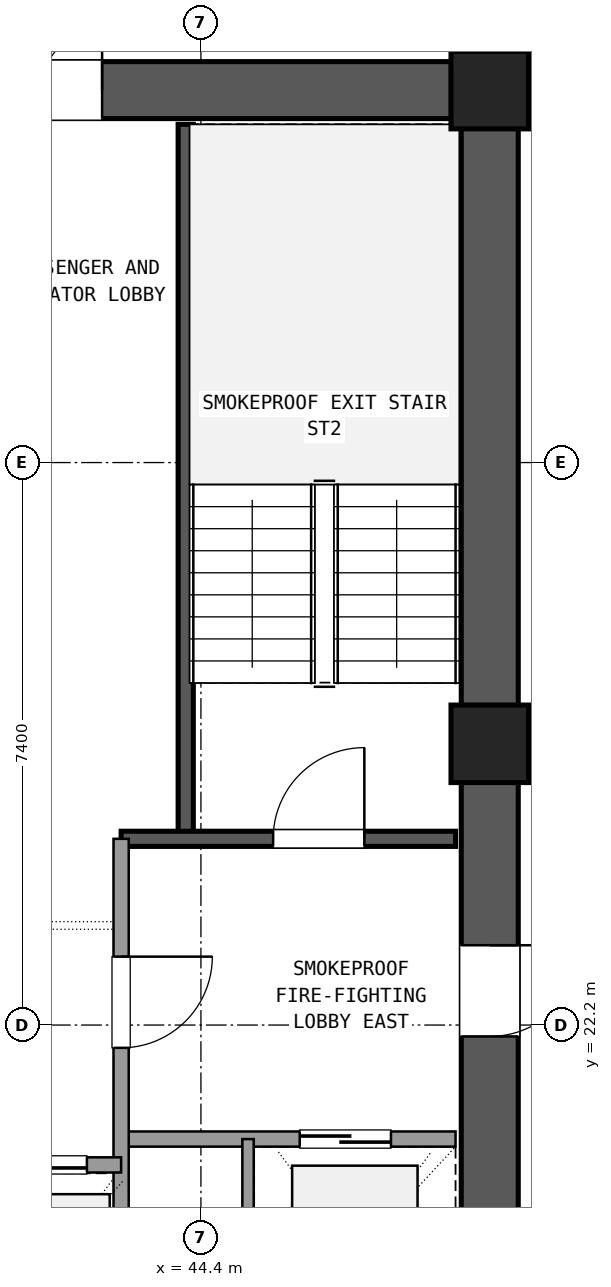
"""IFC4 building model, lengths in metres.
Left out: names, types, materials, properties, quantities, classifications, styles, units other than length and angle.
Written with IfcOpenShell. Run it as: python <this file> out.ifc"""

import sys

from ifc_helpers import new_model, si_unit, direction, frame, frame_2d, origin, origin_2d, place, context, subcontext, project, spatial, rectangle, extrude, element, fill, save


model = new_model("IFC4")
c1 = context("Model", 3, precision=1e-05, world=origin(), true_north=direction((0.0, 1.0)))
c2 = subcontext(c1, "Body", "Model", "MODEL_VIEW")
j1 = project(units=[si_unit("LENGTHUNIT", "METRE"), si_unit("PLANEANGLEUNIT", "RADIAN")], contexts=[c1])
p1 = place(None, origin())
s1 = spatial("IfcSite", under=j1, at=p1, CompositionType="ELEMENT")
p2 = place(p1, origin())
s2 = spatial("IfcBuilding", under=s1, at=p2, CompositionType="ELEMENT")
p3 = place(p2, frame((0.0, 0.0, 102.78)))
s3 = spatial("IfcBuildingStorey", under=s2, at=p3, CompositionType="ELEMENT", Elevation=102.78)
for number, where, z_axis, x_axis in (
    (1, (48.2, 25.9, 0.0), (0.0, 0.0, 1.0), (1.0, 0.0, 0.0)),
    (2, (48.2, 34.5, 0.0), (0.0, 0.0, 1.0), (1.0, 0.0, 0.0)),
):
    element("IfcColumn", number, at=place(p3, frame(where, z_axis=z_axis, x_axis=x_axis)), inside=s3, PredefinedType="COLUMN", context=c2, shape_type="SweptSolid", body=[
        extrude(rectangle(XDim=1.02, YDim=1.02, at=origin_2d()), origin(), (0.0, 0.0, 1.0), 3.6),
    ])
p4 = place(p3, frame((48.2, 17.805, 0.0), z_axis=(0.0, 0.0, 1.0), x_axis=(0.0, 1.0, 0.0)))
e3 = element("IfcWall", 3, at=p4, inside=s3, PredefinedType="SHEAR", context=c2, shape_type="SweptSolid", body=[
    extrude(rectangle(XDim=7.59, YDim=0.75, at=frame_2d((3.795, 0.0))), origin(), (0.0, 0.0, 1.0), 3.32),
])
p5 = place(p4, frame((4.245, 0.0, 0.0)))
e4 = element("IfcOpeningElement", 4, at=p5, cuts=e3, PredefinedType="OPENING", context=c2, shape_type="SweptSolid", body=[
    extrude(rectangle(XDim=1.2, YDim=2.15, at=frame_2d((0.6, 1.075))), frame((0.0, 0.385, 0.0), z_axis=(0.0, -1.0, 0.0), x_axis=(1.0, 0.0, 0.0)), (0.0, 0.0, 1.0), 0.77),
])
p6 = place(p3, frame((48.2, 26.405, 0.0), z_axis=(0.0, 0.0, 1.0), x_axis=(0.0, 1.0, 0.0)))
e5 = element("IfcWall", 5, at=p6, inside=s3, PredefinedType="SHEAR", context=c2, shape_type="SweptSolid", body=[
    extrude(rectangle(XDim=7.59, YDim=0.75, at=frame_2d((3.795, 0.0))), origin(), (0.0, 0.0, 1.0), 3.32),
])
p7 = place(p3, frame((47.695, 34.5, 0.0), z_axis=(0.0, 0.0, 1.0), x_axis=(-1.0, 0.0, 0.0)))
e6 = element("IfcWall", 6, at=p7, inside=s3, PredefinedType="SHEAR", context=c2, shape_type="SweptSolid", body=[
    extrude(rectangle(XDim=10.19, YDim=0.75, at=frame_2d((5.095, 0.0))), origin(), (0.0, 0.0, 1.0), 3.32),
])
p8 = place(p7, frame((4.595, 0.0, 0.0)))
e7 = element("IfcOpeningElement", 7, at=p8, cuts=e6, PredefinedType="OPENING", context=c2, shape_type="SweptSolid", body=[
    extrude(rectangle(XDim=1.6, YDim=2.2, at=frame_2d((0.8, 1.1))), frame((0.0, 0.385, 0.0), z_axis=(0.0, -1.0, 0.0), x_axis=(1.0, 0.0, 0.0)), (0.0, 0.0, 1.0), 0.77),
])
p9 = place(p3, frame((44.2, 24.65, 0.0), z_axis=(0.0, 0.0, 1.0), x_axis=(0.0, 1.0, 0.0)))
e8 = element("IfcWall", 8, at=p9, inside=s3, PredefinedType="SHEAR", context=c2, shape_type="SweptSolid", body=[
    extrude(rectangle(XDim=9.4, YDim=0.2, at=frame_2d((4.7, 0.0))), origin(), (0.0, 0.0, 1.0), 3.32),
])
p10 = place(p3, frame((43.35, 24.65, 0.0), z_axis=(0.0, 0.0, 1.0), x_axis=(1.0, 0.0, 0.0)))
e9 = element("IfcWall", 9, at=p10, inside=s3, PredefinedType="SHEAR", context=c2, shape_type="SweptSolid", body=[
    extrude(rectangle(XDim=4.4, YDim=0.2, at=frame_2d((2.2, 0.0))), origin(), (0.0, 0.0, 1.0), 3.32),
])
p11 = place(p10, frame((2.0, 0.0, 0.0)))
e10 = element("IfcOpeningElement", 10, at=p11, cuts=e9, PredefinedType="OPENING", context=c2, shape_type="SweptSolid", body=[
    extrude(rectangle(XDim=1.2, YDim=2.15, at=frame_2d((0.6, 1.075))), frame((0.0, 0.11, 0.0), z_axis=(0.0, -1.0, 0.0), x_axis=(1.0, 0.0, 0.0)), (0.0, 0.0, 1.0), 0.22),
])
p12 = place(p3, frame((43.35, 20.7, 0.0), z_axis=(0.0, 0.0, 1.0), x_axis=(1.0, 0.0, 0.0)))
e11 = element("IfcWall", 11, at=p12, inside=s3, PredefinedType="SOLIDWALL", context=c2, shape_type="SweptSolid", body=[
    extrude(rectangle(XDim=4.4, YDim=0.2, at=frame_2d((2.2, 0.0))), origin(), (0.0, 0.0, 1.0), 2.61),
])
p13 = place(p12, frame((2.35, 0.0, 0.0)))
e12 = element("IfcOpeningElement", 12, at=p13, cuts=e11, PredefinedType="OPENING", context=c2, shape_type="SweptSolid", body=[
    extrude(rectangle(XDim=1.2, YDim=2.15, at=frame_2d((0.6, 1.075))), frame((0.0, 0.11, 0.0), z_axis=(0.0, -1.0, 0.0), x_axis=(1.0, 0.0, 0.0)), (0.0, 0.0, 1.0), 0.22),
])
p14 = place(p3, frame((43.35, 17.75, 0.0), z_axis=(0.0, 0.0, 1.0), x_axis=(0.0, 1.0, 0.0)))
e13 = element("IfcWall", 13, at=p14, inside=s3, PredefinedType="SOLIDWALL", context=c2, shape_type="SweptSolid", body=[
    extrude(rectangle(XDim=6.9, YDim=0.2, at=frame_2d((3.45, 0.0))), origin(), (0.0, 0.0, 1.0), 2.61),
])
p15 = place(p14, frame((4.15, 0.0, 0.0)))
e14 = element("IfcOpeningElement", 14, at=p15, cuts=e13, PredefinedType="OPENING", context=c2, shape_type="SweptSolid", body=[
    extrude(rectangle(XDim=1.2, YDim=2.15, at=frame_2d((0.6, 1.075))), frame((0.0, 0.11, 0.0), z_axis=(0.0, -1.0, 0.0), x_axis=(1.0, 0.0, 0.0)), (0.0, 0.0, 1.0), 0.22),
])
p16 = place(p3, frame((45.02, 17.75, 0.0), z_axis=(0.0, 0.0, 1.0), x_axis=(0.0, 1.0, 0.0)))
e15 = element("IfcWall", 15, at=p16, inside=s3, PredefinedType="PARTITIONING", context=c2, shape_type="SweptSolid", body=[
    extrude(rectangle(XDim=2.95, YDim=0.15, at=frame_2d((1.475, 0.0))), origin(), (0.0, 0.0, 1.0), 2.61),
])
p17 = place(p3, frame((37.25, 20.36, 0.0), z_axis=(0.0, 0.0, 1.0), x_axis=(1.0, 0.0, 0.0)))
e16 = element("IfcWall", 16, at=p17, inside=s3, PredefinedType="SOLIDWALL", context=c2, shape_type="SweptSolid", body=[
    extrude(rectangle(XDim=6.1, YDim=0.2, at=frame_2d((3.05, 0.0))), origin(), (0.0, 0.0, 1.0), 2.61),
])
p18 = place(p17, frame((0.45, 0.0, 0.0)))
e17 = element("IfcOpeningElement", 17, at=p18, cuts=e16, PredefinedType="OPENING", context=c2, shape_type="SweptSolid", body=[
    extrude(rectangle(XDim=1.1, YDim=2.15, at=frame_2d((0.55, 1.075))), frame((0.0, 0.11, 0.0), z_axis=(0.0, -1.0, 0.0), x_axis=(1.0, 0.0, 0.0)), (0.0, 0.0, 1.0), 0.22),
])
p19 = place(p17, frame((2.5, 0.0, 0.0)))
e18 = element("IfcOpeningElement", 18, at=p19, cuts=e16, PredefinedType="OPENING", context=c2, shape_type="SweptSolid", body=[
    extrude(rectangle(XDim=1.1, YDim=2.15, at=frame_2d((0.55, 1.075))), frame((0.0, 0.11, 0.0), z_axis=(0.0, -1.0, 0.0), x_axis=(1.0, 0.0, 0.0)), (0.0, 0.0, 1.0), 0.22),
])
p20 = place(p17, frame((4.55, 0.0, 0.0)))
e19 = element("IfcOpeningElement", 19, at=p20, cuts=e16, PredefinedType="OPENING", context=c2, shape_type="SweptSolid", body=[
    extrude(rectangle(XDim=1.1, YDim=2.15, at=frame_2d((0.55, 1.075))), frame((0.0, 0.11, 0.0), z_axis=(0.0, -1.0, 0.0), x_axis=(1.0, 0.0, 0.0)), (0.0, 0.0, 1.0), 0.22),
])
p21 = place(p11, origin())
e20 = element("IfcDoor", 20, at=p21, inside=s3, OperationType="SINGLE_SWING_RIGHT", PredefinedType="DOOR", context=c2, shape_type="SweptSolid", body=[
    extrude(rectangle(XDim=1.2, YDim=2.15, at=frame_2d((0.6, 1.075))), frame((0.0, 0.025, 0.0), z_axis=(0.0, -1.0, 0.0), x_axis=(1.0, 0.0, 0.0)), (0.0, 0.0, 1.0), 0.05),
])
fill(e10, e20)
p22 = place(p13, origin())
e21 = element("IfcDoor", 21, at=p22, inside=s3, OperationType="SLIDING_TO_RIGHT", PredefinedType="DOOR", context=c2, shape_type="SweptSolid", body=[
    extrude(rectangle(XDim=1.2, YDim=2.15, at=frame_2d((0.6, 1.075))), frame((0.0, 0.025, 0.0), z_axis=(0.0, -1.0, 0.0), x_axis=(1.0, 0.0, 0.0)), (0.0, 0.0, 1.0), 0.05),
])
fill(e12, e21)
p23 = place(p15, frame((1.2, 0.0, 0.0), z_axis=(0.0, 0.0, 1.0), x_axis=(-1.0, 0.0, 0.0)))
e22 = element("IfcDoor", 22, at=p23, inside=s3, OperationType="SINGLE_SWING_RIGHT", PredefinedType="DOOR", context=c2, shape_type="SweptSolid", body=[
    extrude(rectangle(XDim=1.2, YDim=2.15, at=frame_2d((0.6, 1.075))), frame((0.0, 0.025, 0.0), z_axis=(0.0, -1.0, 0.0), x_axis=(1.0, 0.0, 0.0)), (0.0, 0.0, 1.0), 0.05),
])
fill(e14, e22)
p24 = place(p5, frame((1.2, 0.0, 0.0), z_axis=(0.0, 0.0, 1.0), x_axis=(-1.0, 0.0, 0.0)))
e23 = element("IfcDoor", 23, at=p24, inside=s3, OperationType="SINGLE_SWING_RIGHT", PredefinedType="DOOR", context=c2, shape_type="SweptSolid", body=[
    extrude(rectangle(XDim=1.2, YDim=2.15, at=frame_2d((0.6, 1.075))), frame((0.0, 0.025, 0.0), z_axis=(0.0, -1.0, 0.0), x_axis=(1.0, 0.0, 0.0)), (0.0, 0.0, 1.0), 0.05),
])
fill(e4, e23)
p25 = place(p8, frame((1.6, 0.0, 0.0), z_axis=(0.0, 0.0, 1.0), x_axis=(-1.0, 0.0, 0.0)))
e24 = element("IfcDoor", 24, at=p25, inside=s3, OperationType="DOUBLE_DOOR_SINGLE_SWING", PredefinedType="DOOR", context=c2, shape_type="SweptSolid", body=[
    extrude(rectangle(XDim=1.6, YDim=2.2, at=frame_2d((0.8, 1.1))), frame((0.0, 0.025, 0.0), z_axis=(0.0, -1.0, 0.0), x_axis=(1.0, 0.0, 0.0)), (0.0, 0.0, 1.0), 0.05),
])
fill(e7, e24)
p26 = place(p20, origin())
e25 = element("IfcDoor", 25, at=p26, inside=s3, OperationType="SLIDING_TO_LEFT", PredefinedType="DOOR", context=c2, shape_type="SweptSolid", body=[
    extrude(rectangle(XDim=1.1, YDim=2.15, at=frame_2d((0.55, 1.075))), frame((0.0, 0.025, 0.0), z_axis=(0.0, -1.0, 0.0), x_axis=(1.0, 0.0, 0.0)), (0.0, 0.0, 1.0), 0.05),
])
fill(e19, e25)
save(model, sys.argv[1])
